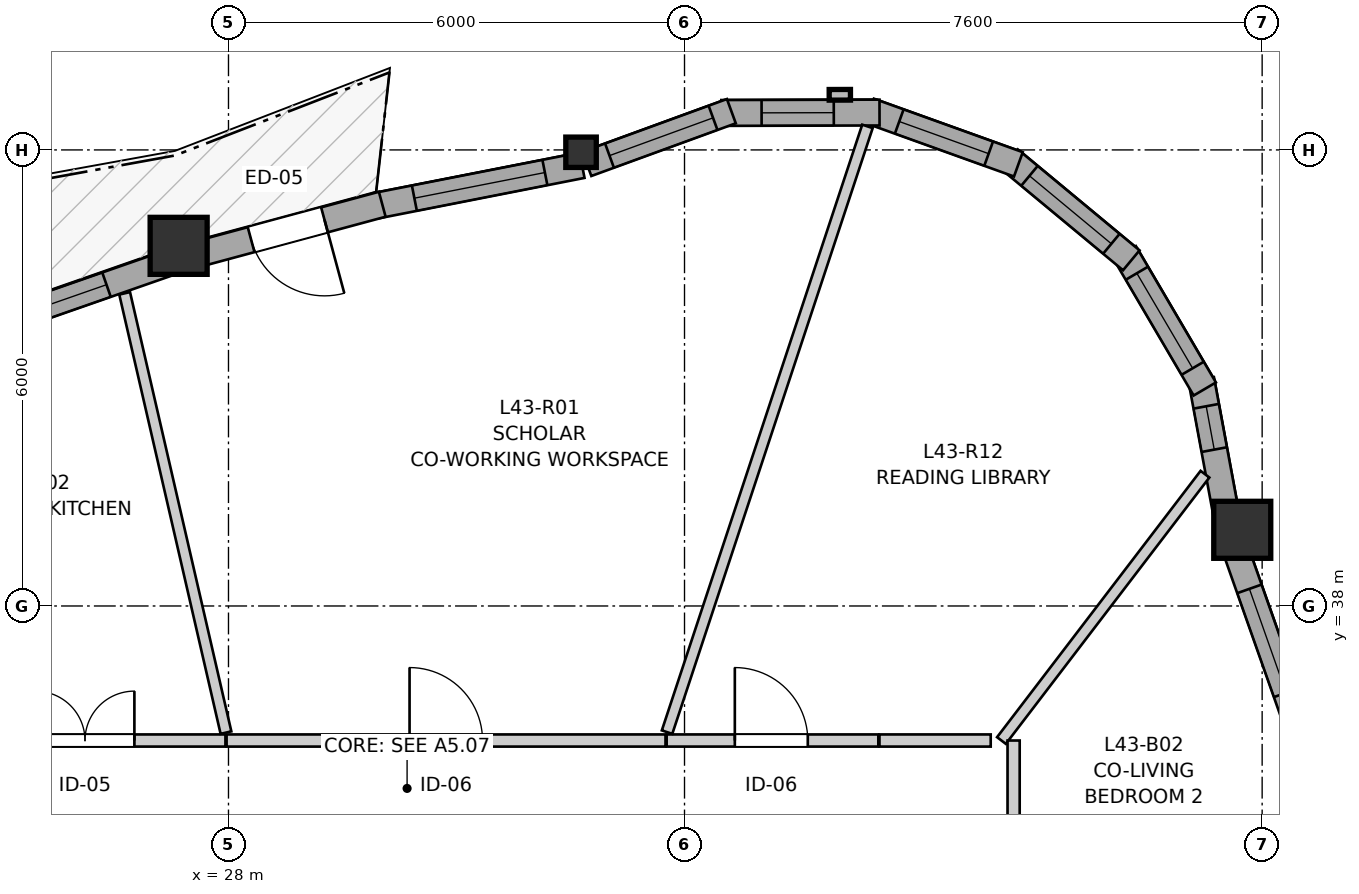
"""IFC4 building model, lengths in metres.
Left out: names, types, materials, properties, quantities, classifications, styles, units other than length and angle.
Written with IfcOpenShell. Run it as: python <this file> out.ifc"""

import sys

from ifc_helpers import new_model, si_unit, direction, frame, frame_2d, origin, origin_2d, place, context, subcontext, project, spatial, rectangle, i_section, extrude, source, transform, mapped, element, fill, save


model = new_model("IFC4")
c1 = context("Model", 3, precision=1e-05, world=origin(), true_north=direction((0.0, 1.0)))
c2 = subcontext(c1, "Body", "Model", "MODEL_VIEW")
j1 = project(units=[si_unit("LENGTHUNIT", "METRE"), si_unit("PLANEANGLEUNIT", "RADIAN")], contexts=[c1])
p1 = place(None, origin())
s1 = spatial("IfcSite", under=j1, at=p1, CompositionType="ELEMENT")
p2 = place(p1, origin())
s2 = spatial("IfcBuilding", under=s1, at=p2, CompositionType="ELEMENT")
p3 = place(p2, frame((0.0, 0.0, 145.8)))
s3 = spatial("IfcBuildingStorey", under=s2, at=p3, CompositionType="ELEMENT", Elevation=145.8)
m1 = source(origin(), c2, "Body", "SweptSolid", [
    extrude(rectangle(XDim=0.75, YDim=0.75, at=origin_2d()), origin(), (0.0, 0.0, 1.0), 2.95),
])
p4 = place(p3, frame((41.338, 39.002, 0.0), z_axis=(0.0, 0.0, 1.0), x_axis=(1.0, 0.0, 0.0)))
e1 = element("IfcColumn", 1, at=p4, inside=s3, PredefinedType="COLUMN", context=c2, shape_type="MappedRepresentation", body=[
    mapped(m1, transform((0.0, 0.0, 0.0), x_axis=(1.0, 0.0, 0.0), y_axis=(0.0, 1.0, 0.0), z_axis=(0.0, 0.0, 1.0), scale=1.0)),
])
m2 = source(origin(), c2, "Body", "SweptSolid", [
    extrude(i_section(OverallWidth=0.401, OverallDepth=0.399, WebThickness=0.023, FlangeThickness=0.036, FilletRadius=0.015, at=origin_2d()), origin(), (0.0, 0.0, 1.0), 2.95),
])
p5 = place(p3, frame((32.639, 43.969, 0.0), z_axis=(0.0, 0.0, 1.0), x_axis=(1.0, 0.0, 0.0)))
e2 = element("IfcColumn", 2, at=p5, inside=s3, PredefinedType="PILASTER", context=c2, shape_type="MappedRepresentation", body=[
    mapped(m2, transform((0.0, 0.0, 0.0), x_axis=(1.0, 0.0, 0.0), y_axis=(0.0, 1.0, 0.0), z_axis=(0.0, 0.0, 1.0), scale=1.0)),
])
p6 = place(p3, frame((27.344, 42.738, 0.0), z_axis=(0.0, 0.0, 1.0), x_axis=(1.0, 0.0, 0.0)))
e3 = element("IfcColumn", 3, at=p6, inside=s3, PredefinedType="COLUMN", context=c2, shape_type="MappedRepresentation", body=[
    mapped(m1, transform((0.0, 0.0, 0.0), x_axis=(1.0, 0.0, 0.0), y_axis=(0.0, 1.0, 0.0), z_axis=(0.0, 0.0, 1.0), scale=1.0)),
])
p7 = place(p3, frame((42.121, 36.274, 0.0), z_axis=(0.0, 0.0, 1.0), x_axis=(-0.332724751299, 0.943023986902, 0.0)))
e4 = element("IfcWall", 4, at=p7, inside=s3, PredefinedType="SOLIDWALL", context=c2, shape_type="SweptSolid", body=[
    extrude(rectangle(XDim=2.678, YDim=0.34, at=frame_2d((1.339, 0.0))), origin(), (0.0, 0.0, 1.0), 2.53),
])
p8 = place(p7, frame((0.619, 0.0, 0.82)))
e5 = element("IfcOpeningElement", 5, at=p8, cuts=e4, PredefinedType="OPENING", context=c2, shape_type="SweptSolid", body=[
    extrude(rectangle(XDim=1.45, YDim=1.25, at=frame_2d((0.725, 0.625))), frame((0.0, 0.18, 0.0), z_axis=(0.0, -1.0, 0.0), x_axis=(1.0, 0.0, 0.0)), (0.0, 0.0, 1.0), 0.36),
])
p9 = place(p3, frame((41.143, 39.124, 0.0), z_axis=(0.0, 0.0, 1.0), x_axis=(-0.182320770307, 0.983239104549, 0.0)))
e6 = element("IfcWall", 6, at=p9, inside=s3, PredefinedType="SOLIDWALL", context=c2, shape_type="SweptSolid", body=[
    extrude(rectangle(XDim=1.888, YDim=0.34, at=frame_2d((0.944, 0.0))), origin(), (0.0, 0.0, 1.0), 2.53),
])
p10 = place(p9, frame((0.949, 0.0, 0.82)))
e7 = element("IfcOpeningElement", 7, at=p10, cuts=e6, PredefinedType="OPENING", context=c2, shape_type="SweptSolid", body=[
    extrude(rectangle(XDim=0.58, YDim=1.35, at=frame_2d((0.29, 0.675))), frame((0.0, 0.18, 0.0), z_axis=(0.0, -1.0, 0.0), x_axis=(1.0, 0.0, 0.0)), (0.0, 0.0, 1.0), 0.36),
])
p11 = place(p3, frame((40.845, 40.855, 0.0), z_axis=(0.0, 0.0, 1.0), x_axis=(-0.506225227923, 0.862401309493, 0.0)))
e8 = element("IfcWall", 8, at=p11, inside=s3, PredefinedType="SOLIDWALL", context=c2, shape_type="SweptSolid", body=[
    extrude(rectangle(XDim=2.081, YDim=0.34, at=frame_2d((1.041, 0.0))), origin(), (0.0, 0.0, 1.0), 2.53),
])
p12 = place(p11, frame((0.316, 0.0, 0.82)))
e9 = element("IfcOpeningElement", 9, at=p12, cuts=e8, PredefinedType="OPENING", context=c2, shape_type="SweptSolid", body=[
    extrude(rectangle(XDim=1.45, YDim=1.25, at=frame_2d((0.725, 0.625))), frame((0.0, 0.18, 0.0), z_axis=(0.0, -1.0, 0.0), x_axis=(1.0, 0.0, 0.0)), (0.0, 0.0, 1.0), 0.36),
])
p13 = place(p3, frame((39.878, 42.548, 0.0), z_axis=(0.0, 0.0, 1.0), x_axis=(-0.769690471148, 0.63841724493, 0.0)))
e10 = element("IfcWall", 10, at=p13, inside=s3, PredefinedType="SOLIDWALL", context=c2, shape_type="SweptSolid", body=[
    extrude(rectangle(XDim=2.081, YDim=0.34, at=frame_2d((1.041, 0.0))), origin(), (0.0, 0.0, 1.0), 2.53),
])
p14 = place(p13, frame((0.341, 0.0, 0.82)))
e11 = element("IfcOpeningElement", 11, at=p14, cuts=e10, PredefinedType="OPENING", context=c2, shape_type="SweptSolid", body=[
    extrude(rectangle(XDim=1.4, YDim=1.35, at=frame_2d((0.7, 0.675))), frame((0.0, 0.18, 0.0), z_axis=(0.0, -1.0, 0.0), x_axis=(1.0, 0.0, 0.0)), (0.0, 0.0, 1.0), 0.36),
])
p15 = place(p3, frame((38.393, 43.81, 0.0), z_axis=(0.0, 0.0, 1.0), x_axis=(-0.941033874027, 0.338312352617, 0.0)))
e12 = element("IfcWall", 12, at=p15, inside=s3, PredefinedType="SOLIDWALL", context=c2, shape_type="SweptSolid", body=[
    extrude(rectangle(XDim=2.081, YDim=0.34, at=frame_2d((1.041, 0.0))), origin(), (0.0, 0.0, 1.0), 2.53),
])
p16 = place(p15, frame((0.416, 0.0, 0.82)))
e13 = element("IfcOpeningElement", 13, at=p16, cuts=e12, PredefinedType="OPENING", context=c2, shape_type="SweptSolid", body=[
    extrude(rectangle(XDim=1.25, YDim=1.35, at=frame_2d((0.625, 0.675))), frame((0.0, 0.18, 0.0), z_axis=(0.0, -1.0, 0.0), x_axis=(1.0, 0.0, 0.0)), (0.0, 0.0, 1.0), 0.36),
])
p17 = place(p3, frame((36.566, 44.491, 0.0), z_axis=(0.0, 0.0, 1.0), x_axis=(-0.999996965984, -0.002463335635, 0.0)))
e14 = element("IfcWall", 14, at=p17, inside=s3, PredefinedType="SOLIDWALL", context=c2, shape_type="SweptSolid", body=[
    extrude(rectangle(XDim=2.081, YDim=0.34, at=frame_2d((1.041, 0.0))), origin(), (0.0, 0.0, 1.0), 2.53),
])
p18 = place(p17, frame((0.602, 0.0, 0.82)))
e15 = element("IfcOpeningElement", 15, at=p18, cuts=e14, PredefinedType="OPENING", context=c2, shape_type="SweptSolid", body=[
    extrude(rectangle(XDim=0.95, YDim=1.35, at=frame_2d((0.475, 0.675))), frame((0.0, 0.18, 0.0), z_axis=(0.0, -1.0, 0.0), x_axis=(1.0, 0.0, 0.0)), (0.0, 0.0, 1.0), 0.36),
])
p19 = place(p3, frame((34.616, 44.51, 0.0), z_axis=(0.0, 0.0, 1.0), x_axis=(-0.939426417976, -0.342750645819, 0.0)))
e16 = element("IfcWall", 16, at=p19, inside=s3, PredefinedType="SOLIDWALL", context=c2, shape_type="SweptSolid", body=[
    extrude(rectangle(XDim=2.023, YDim=0.34, at=frame_2d((1.011, 0.0))), origin(), (0.0, 0.0, 1.0), 2.53),
])
p20 = place(p19, frame((0.257, 0.0, 0.82)))
e17 = element("IfcOpeningElement", 17, at=p20, cuts=e16, PredefinedType="OPENING", context=c2, shape_type="SweptSolid", body=[
    extrude(rectangle(XDim=1.45, YDim=1.25, at=frame_2d((0.725, 0.625))), frame((0.0, 0.18, 0.0), z_axis=(0.0, -1.0, 0.0), x_axis=(1.0, 0.0, 0.0)), (0.0, 0.0, 1.0), 0.36),
])
p21 = place(p3, frame((32.652, 43.799, 0.0), z_axis=(0.0, 0.0, 1.0), x_axis=(-0.98123033563, -0.192839385083, 0.0)))
e18 = element("IfcWall", 18, at=p21, inside=s3, PredefinedType="SOLIDWALL", context=c2, shape_type="SweptSolid", body=[
    extrude(rectangle(XDim=2.766, YDim=0.34, at=frame_2d((1.383, 0.0))), origin(), (0.0, 0.0, 1.0), 2.53),
])
p22 = place(p21, frame((0.498, 0.0, 0.82)))
e19 = element("IfcOpeningElement", 19, at=p22, cuts=e18, PredefinedType="OPENING", context=c2, shape_type="SweptSolid", body=[
    extrude(rectangle(XDim=1.75, YDim=1.3, at=frame_2d((0.875, 0.65))), frame((0.0, 0.18, 0.0), z_axis=(0.0, -1.0, 0.0), x_axis=(1.0, 0.0, 0.0)), (0.0, 0.0, 1.0), 0.36),
])
p23 = place(p3, frame((30.023, 43.285, 0.0), z_axis=(0.0, 0.0, 1.0), x_axis=(-0.965478241218, -0.260483714913, 0.0)))
e20 = element("IfcWall", 20, at=p23, inside=s3, PredefinedType="SOLIDWALL", context=c2, shape_type="SweptSolid", body=[
    extrude(rectangle(XDim=2.574, YDim=0.34, at=frame_2d((1.287, 0.0))), origin(), (0.0, 0.0, 1.0), 2.53),
])
p24 = place(p23, frame((0.787, 0.0, 0.0)))
e21 = element("IfcOpeningElement", 21, at=p24, cuts=e20, PredefinedType="OPENING", context=c2, shape_type="SweptSolid", body=[
    extrude(rectangle(XDim=1.0, YDim=2.1, at=frame_2d((0.5, 1.05))), frame((0.0, 0.18, 0.0), z_axis=(0.0, -1.0, 0.0), x_axis=(1.0, 0.0, 0.0)), (0.0, 0.0, 1.0), 0.36),
])
p25 = place(p3, frame((27.254, 42.527, 0.0), z_axis=(0.0, 0.0, 1.0), x_axis=(-0.944140843313, -0.329542209721, 0.0)))
e22 = element("IfcWall", 22, at=p25, inside=s3, PredefinedType="SOLIDWALL", context=c2, shape_type="SweptSolid", body=[
    extrude(rectangle(XDim=2.53, YDim=0.34, at=frame_2d((1.265, 0.0))), origin(), (0.0, 0.0, 1.0), 2.53),
])
p26 = place(p25, frame((0.909, 0.0, 0.82)))
e23 = element("IfcOpeningElement", 23, at=p26, cuts=e22, PredefinedType="OPENING", context=c2, shape_type="SweptSolid", body=[
    extrude(rectangle(XDim=1.35, YDim=1.45, at=frame_2d((0.675, 0.725))), frame((0.0, 0.18, 0.0), z_axis=(0.0, -1.0, 0.0), x_axis=(1.0, 0.0, 0.0)), (0.0, 0.0, 1.0), 0.36),
])
p27 = place(p3, frame((27.975, 36.23, 0.0), z_axis=(0.0, 0.0, 1.0), x_axis=(1.0, 0.0, 0.0)))
e24 = element("IfcWall", 24, at=p27, inside=s3, PredefinedType="PARTITIONING", context=c2, shape_type="SweptSolid", body=[
    extrude(rectangle(XDim=5.775, YDim=0.16, at=frame_2d((2.887, 0.0))), origin(), (0.0, 0.0, 1.0), 2.588),
])
p28 = place(p27, frame((2.407, 0.0, 0.0)))
e25 = element("IfcOpeningElement", 25, at=p28, cuts=e24, PredefinedType="OPENING", context=c2, shape_type="SweptSolid", body=[
    extrude(rectangle(XDim=0.96, YDim=2.1, at=frame_2d((0.48, 1.05))), frame((0.0, 0.09, 0.0), z_axis=(0.0, -1.0, 0.0), x_axis=(1.0, 0.0, 0.0)), (0.0, 0.0, 1.0), 0.18),
])
p29 = place(p3, frame((24.215, 36.23, 0.0), z_axis=(0.0, 0.0, 1.0), x_axis=(1.0, 0.0, 0.0)))
e26 = element("IfcWall", 26, at=p29, inside=s3, PredefinedType="PARTITIONING", context=c2, shape_type="SweptSolid", body=[
    extrude(rectangle(XDim=3.745, YDim=0.16, at=frame_2d((1.873, 0.0))), origin(), (0.0, 0.0, 1.0), 2.95),
])
p30 = place(p29, frame((1.247, 0.0, 0.0)))
e27 = element("IfcOpeningElement", 27, at=p30, cuts=e26, PredefinedType="OPENING", context=c2, shape_type="SweptSolid", body=[
    extrude(rectangle(XDim=1.3, YDim=2.1, at=frame_2d((0.65, 1.05))), frame((0.0, 0.09, 0.0), z_axis=(0.0, -1.0, 0.0), x_axis=(1.0, 0.0, 0.0)), (0.0, 0.0, 1.0), 0.18),
])
p31 = place(p3, frame((33.765, 36.23, 0.0), z_axis=(0.0, 0.0, 1.0), x_axis=(1.0, 0.0, 0.0)))
e28 = element("IfcWall", 28, at=p31, inside=s3, PredefinedType="PARTITIONING", context=c2, shape_type="SweptSolid", body=[
    extrude(rectangle(XDim=2.785, YDim=0.16, at=frame_2d((1.393, 0.0))), origin(), (0.0, 0.0, 1.0), 2.588),
])
p32 = place(p31, frame((0.897, 0.0, 0.0)))
e29 = element("IfcOpeningElement", 29, at=p32, cuts=e28, PredefinedType="OPENING", context=c2, shape_type="SweptSolid", body=[
    extrude(rectangle(XDim=0.96, YDim=2.1, at=frame_2d((0.48, 1.05))), frame((0.0, 0.09, 0.0), z_axis=(0.0, -1.0, 0.0), x_axis=(1.0, 0.0, 0.0)), (0.0, 0.0, 1.0), 0.18),
])
p33 = place(p3, frame((33.771, 36.34, 0.0), z_axis=(0.0, 0.0, 1.0), x_axis=(0.314080540859, 0.949396341816, 0.0)))
e30 = element("IfcWall", 30, at=p33, inside=s3, PredefinedType="PARTITIONING", context=c2, shape_type="SweptSolid", body=[
    extrude(rectangle(XDim=8.394, YDim=0.145, at=frame_2d((4.197, 0.0))), origin(), (0.0, 0.0, 1.0), 2.95),
])
p34 = place(p3, frame((26.634, 42.113, 0.0), z_axis=(0.0, 0.0, 1.0), x_axis=(0.224790361783, -0.97440714963, 0.0)))
e31 = element("IfcWall", 31, at=p34, inside=s3, PredefinedType="PARTITIONING", context=c2, shape_type="SweptSolid", body=[
    extrude(rectangle(XDim=5.931, YDim=0.145, at=frame_2d((2.966, 0.0))), origin(), (0.0, 0.0, 1.0), 2.95),
])
p35 = place(p3, frame((38.17, 36.23, 0.0), z_axis=(0.0, 0.0, 1.0), x_axis=(0.607203490548, 0.794546361811, 0.0)))
e32 = element("IfcWall", 32, at=p35, inside=s3, PredefinedType="PARTITIONING", context=c2, shape_type="SweptSolid", body=[
    extrude(rectangle(XDim=4.41, YDim=0.145, at=frame_2d((2.205, 0.0))), origin(), (0.0, 0.0, 1.0), 2.95),
])
p36 = place(p3, frame((38.33, 34.465, 0.0), z_axis=(0.0, 0.0, 1.0), x_axis=(0.0, 1.0, 0.0)))
e33 = element("IfcWall", 33, at=p36, inside=s3, PredefinedType="PARTITIONING", context=c2, shape_type="SweptSolid", body=[
    extrude(rectangle(XDim=1.765, YDim=0.16, at=frame_2d((0.882, 0.0))), origin(), (0.0, 0.0, 1.0), 2.588),
])
p37 = place(p3, frame((36.565, 36.23, 0.0), z_axis=(0.0, 0.0, 1.0), x_axis=(1.0, 0.0, 0.0)))
e34 = element("IfcWall", 34, at=p37, inside=s3, PredefinedType="PARTITIONING", context=c2, shape_type="SweptSolid", body=[
    extrude(rectangle(XDim=1.464, YDim=0.16, at=frame_2d((0.732, 0.0))), origin(), (0.0, 0.0, 1.0), 2.95),
])
m3 = source(origin(), c2, "Body", "SweptSolid", [
    extrude(rectangle(XDim=1.45, YDim=1.25, at=frame_2d((0.725, 0.625))), frame((0.0, 0.03, 0.0), z_axis=(0.0, -1.0, 0.0), x_axis=(1.0, 0.0, 0.0)), (0.0, 0.0, 1.0), 0.06),
])
p38 = place(p8, origin())
e35 = element("IfcWindow", 35, at=p38, inside=s3, PartitioningType="SINGLE_PANEL", PredefinedType="WINDOW", context=c2, shape_type="MappedRepresentation", body=[
    mapped(m3, transform((0.0, 0.0, 0.0), x_axis=(1.0, 0.0, 0.0), y_axis=(0.0, 1.0, 0.0), z_axis=(0.0, 0.0, 1.0), scale=1.0)),
])
fill(e5, e35)
m4 = source(origin(), c2, "Body", "SweptSolid", [
    extrude(rectangle(XDim=0.58, YDim=1.35, at=frame_2d((0.29, 0.675))), frame((0.0, 0.03, 0.0), z_axis=(0.0, -1.0, 0.0), x_axis=(1.0, 0.0, 0.0)), (0.0, 0.0, 1.0), 0.06),
])
p39 = place(p10, origin())
e36 = element("IfcWindow", 36, at=p39, inside=s3, PartitioningType="SINGLE_PANEL", PredefinedType="WINDOW", context=c2, shape_type="MappedRepresentation", body=[
    mapped(m4, transform((0.0, 0.0, 0.0), x_axis=(1.0, 0.0, 0.0), y_axis=(0.0, 1.0, 0.0), z_axis=(0.0, 0.0, 1.0), scale=1.0)),
])
fill(e7, e36)
p40 = place(p12, origin())
e37 = element("IfcWindow", 37, at=p40, inside=s3, PartitioningType="SINGLE_PANEL", PredefinedType="WINDOW", context=c2, shape_type="MappedRepresentation", body=[
    mapped(m3, transform((0.0, 0.0, 0.0), x_axis=(1.0, 0.0, 0.0), y_axis=(0.0, 1.0, 0.0), z_axis=(0.0, 0.0, 1.0), scale=1.0)),
])
fill(e9, e37)
m5 = source(origin(), c2, "Body", "SweptSolid", [
    extrude(rectangle(XDim=1.4, YDim=1.35, at=frame_2d((0.7, 0.675))), frame((0.0, 0.03, 0.0), z_axis=(0.0, -1.0, 0.0), x_axis=(1.0, 0.0, 0.0)), (0.0, 0.0, 1.0), 0.06),
])
p41 = place(p14, origin())
e38 = element("IfcWindow", 38, at=p41, inside=s3, PartitioningType="SINGLE_PANEL", PredefinedType="WINDOW", context=c2, shape_type="MappedRepresentation", body=[
    mapped(m5, transform((0.0, 0.0, 0.0), x_axis=(1.0, 0.0, 0.0), y_axis=(0.0, 1.0, 0.0), z_axis=(0.0, 0.0, 1.0), scale=1.0)),
])
fill(e11, e38)
m6 = source(origin(), c2, "Body", "SweptSolid", [
    extrude(rectangle(XDim=1.25, YDim=1.35, at=frame_2d((0.625, 0.675))), frame((0.0, 0.03, 0.0), z_axis=(0.0, -1.0, 0.0), x_axis=(1.0, 0.0, 0.0)), (0.0, 0.0, 1.0), 0.06),
])
p42 = place(p16, origin())
e39 = element("IfcWindow", 39, at=p42, inside=s3, PartitioningType="SINGLE_PANEL", PredefinedType="WINDOW", context=c2, shape_type="MappedRepresentation", body=[
    mapped(m6, transform((0.0, 0.0, 0.0), x_axis=(1.0, 0.0, 0.0), y_axis=(0.0, 1.0, 0.0), z_axis=(0.0, 0.0, 1.0), scale=1.0)),
])
fill(e13, e39)
m7 = source(origin(), c2, "Body", "SweptSolid", [
    extrude(rectangle(XDim=0.95, YDim=1.35, at=frame_2d((0.475, 0.675))), frame((0.0, 0.03, 0.0), z_axis=(0.0, -1.0, 0.0), x_axis=(1.0, 0.0, 0.0)), (0.0, 0.0, 1.0), 0.06),
])
p43 = place(p18, origin())
e40 = element("IfcWindow", 40, at=p43, inside=s3, PartitioningType="SINGLE_PANEL", PredefinedType="WINDOW", context=c2, shape_type="MappedRepresentation", body=[
    mapped(m7, transform((0.0, 0.0, 0.0), x_axis=(1.0, 0.0, 0.0), y_axis=(0.0, 1.0, 0.0), z_axis=(0.0, 0.0, 1.0), scale=1.0)),
])
fill(e15, e40)
p44 = place(p20, origin())
e41 = element("IfcWindow", 41, at=p44, inside=s3, PartitioningType="SINGLE_PANEL", PredefinedType="WINDOW", context=c2, shape_type="MappedRepresentation", body=[
    mapped(m3, transform((0.0, 0.0, 0.0), x_axis=(1.0, 0.0, 0.0), y_axis=(0.0, 1.0, 0.0), z_axis=(0.0, 0.0, 1.0), scale=1.0)),
])
fill(e17, e41)
m8 = source(origin(), c2, "Body", "SweptSolid", [
    extrude(rectangle(XDim=1.75, YDim=1.3, at=frame_2d((0.875, 0.65))), frame((0.0, 0.03, 0.0), z_axis=(0.0, -1.0, 0.0), x_axis=(1.0, 0.0, 0.0)), (0.0, 0.0, 1.0), 0.06),
])
p45 = place(p22, origin())
e42 = element("IfcWindow", 42, at=p45, inside=s3, PartitioningType="SINGLE_PANEL", PredefinedType="WINDOW", context=c2, shape_type="MappedRepresentation", body=[
    mapped(m8, transform((0.0, 0.0, 0.0), x_axis=(1.0, 0.0, 0.0), y_axis=(0.0, 1.0, 0.0), z_axis=(0.0, 0.0, 1.0), scale=1.0)),
])
fill(e19, e42)
m9 = source(origin(), c2, "Body", "SweptSolid", [
    extrude(rectangle(XDim=1.35, YDim=1.45, at=frame_2d((0.675, 0.725))), frame((0.0, 0.03, 0.0), z_axis=(0.0, -1.0, 0.0), x_axis=(1.0, 0.0, 0.0)), (0.0, 0.0, 1.0), 0.06),
])
p46 = place(p26, origin())
e43 = element("IfcWindow", 43, at=p46, inside=s3, PartitioningType="SINGLE_PANEL", PredefinedType="WINDOW", context=c2, shape_type="MappedRepresentation", body=[
    mapped(m9, transform((0.0, 0.0, 0.0), x_axis=(1.0, 0.0, 0.0), y_axis=(0.0, 1.0, 0.0), z_axis=(0.0, 0.0, 1.0), scale=1.0)),
])
fill(e23, e43)
m10 = source(origin(), c2, "Body", "SweptSolid", [
    extrude(rectangle(XDim=1.0, YDim=2.1, at=frame_2d((0.5, 1.05))), frame((0.0, 0.025, 0.0), z_axis=(0.0, -1.0, 0.0), x_axis=(1.0, 0.0, 0.0)), (0.0, 0.0, 1.0), 0.05),
])
p47 = place(p24, origin())
e44 = element("IfcDoor", 44, at=p47, inside=s3, OperationType="SINGLE_SWING_LEFT", PredefinedType="DOOR", context=c2, shape_type="MappedRepresentation", body=[
    mapped(m10, transform((0.0, 0.0, 0.0), x_axis=(1.0, 0.0, 0.0), y_axis=(0.0, 1.0, 0.0), z_axis=(0.0, 0.0, 1.0), scale=1.0)),
])
fill(e21, e44)
m11 = source(origin(), c2, "Body", "SweptSolid", [
    extrude(rectangle(XDim=0.96, YDim=2.1, at=frame_2d((0.48, 1.05))), frame((0.0, 0.025, 0.0), z_axis=(0.0, -1.0, 0.0), x_axis=(1.0, 0.0, 0.0)), (0.0, 0.0, 1.0), 0.05),
])
p48 = place(p28, origin())
e45 = element("IfcDoor", 45, at=p48, inside=s3, OperationType="SINGLE_SWING_LEFT", PredefinedType="DOOR", context=c2, shape_type="MappedRepresentation", body=[
    mapped(m11, transform((0.0, 0.0, 0.0), x_axis=(1.0, 0.0, 0.0), y_axis=(0.0, 1.0, 0.0), z_axis=(0.0, 0.0, 1.0), scale=1.0)),
])
fill(e25, e45)
m12 = source(origin(), c2, "Body", "SweptSolid", [
    extrude(rectangle(XDim=1.3, YDim=2.1, at=frame_2d((0.65, 1.05))), frame((0.0, 0.025, 0.0), z_axis=(0.0, -1.0, 0.0), x_axis=(1.0, 0.0, 0.0)), (0.0, 0.0, 1.0), 0.05),
])
p49 = place(p30, origin())
e46 = element("IfcDoor", 46, at=p49, inside=s3, OperationType="DOUBLE_DOOR_SINGLE_SWING", PredefinedType="DOOR", context=c2, shape_type="MappedRepresentation", body=[
    mapped(m12, transform((0.0, 0.0, 0.0), x_axis=(1.0, 0.0, 0.0), y_axis=(0.0, 1.0, 0.0), z_axis=(0.0, 0.0, 1.0), scale=1.0)),
])
fill(e27, e46)
p50 = place(p32, origin())
e47 = element("IfcDoor", 47, at=p50, inside=s3, OperationType="SINGLE_SWING_LEFT", PredefinedType="DOOR", context=c2, shape_type="MappedRepresentation", body=[
    mapped(m11, transform((0.0, 0.0, 0.0), x_axis=(1.0, 0.0, 0.0), y_axis=(0.0, 1.0, 0.0), z_axis=(0.0, 0.0, 1.0), scale=1.0)),
])
fill(e29, e47)
save(model, sys.argv[1])
